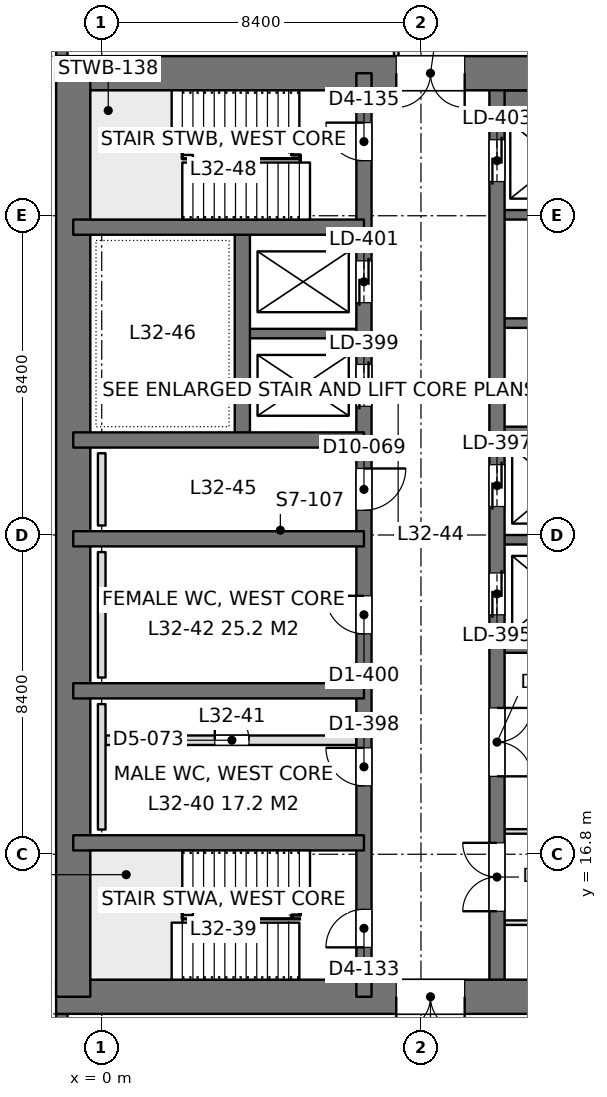
"""IFC4 building model, lengths in metres.
Left out: names, types, materials, properties, quantities, classifications, styles, units other than length and angle.
Written with IfcOpenShell. Run it as: python <this file> out.ifc"""

import sys

from ifc_helpers import new_model, si_unit, direction, frame, frame_2d, origin, place, context, subcontext, project, spatial, rectangle, extrude, element, fill, save


model = new_model("IFC4")
c1 = context("Model", 3, precision=1e-05, world=origin(), true_north=direction((0.0, 1.0)))
c2 = subcontext(c1, "Body", "Model", "MODEL_VIEW")
j1 = project(units=[si_unit("LENGTHUNIT", "METRE"), si_unit("PLANEANGLEUNIT", "RADIAN")], contexts=[c1])
p1 = place(None, origin())
s1 = spatial("IfcSite", under=j1, at=p1, CompositionType="ELEMENT")
p2 = place(p1, origin())
s2 = spatial("IfcBuilding", under=s1, at=p2, CompositionType="ELEMENT")
p3 = place(p2, frame((0.0, 0.0, 142.8)))
s3 = spatial("IfcBuildingStorey", under=s2, at=p3, CompositionType="ELEMENT", Elevation=142.8)
p4 = place(p3, frame((-1.2, 13.05, 0.0), z_axis=(0.0, 0.0, 1.0), x_axis=(1.0, 0.0, 0.0)))
e1 = element("IfcWall", 1, at=p4, inside=s3, PredefinedType="SHEAR", context=c2, shape_type="SweptSolid", body=[
    extrude(rectangle(XDim=18.0, YDim=0.9, at=frame_2d((9.0, 0.0))), origin(), (0.0, 0.0, 1.0), 4.2),
])
p5 = place(p4, frame((8.95, 0.0, 0.0)))
e2 = element("IfcOpeningElement", 2, at=p5, cuts=e1, PredefinedType="OPENING", context=c2, shape_type="SweptSolid", body=[
    extrude(rectangle(XDim=1.8, YDim=2.4, at=frame_2d((0.9, 1.2))), frame((0.0, 0.46, 0.0), z_axis=(0.0, -1.0, 0.0), x_axis=(1.0, 0.0, 0.0)), (0.0, 0.0, 1.0), 0.92),
])
p6 = place(p3, frame((-1.2, 37.35, 0.0), z_axis=(0.0, 0.0, 1.0), x_axis=(1.0, 0.0, 0.0)))
e3 = element("IfcWall", 3, at=p6, inside=s3, PredefinedType="SHEAR", context=c2, shape_type="SweptSolid", body=[
    extrude(rectangle(XDim=18.0, YDim=0.9, at=frame_2d((9.0, 0.0))), origin(), (0.0, 0.0, 1.0), 4.2),
])
p7 = place(p6, frame((8.95, 0.0, 0.0)))
e4 = element("IfcOpeningElement", 4, at=p7, cuts=e3, PredefinedType="OPENING", context=c2, shape_type="SweptSolid", body=[
    extrude(rectangle(XDim=1.8, YDim=2.4, at=frame_2d((0.9, 1.2))), frame((0.0, 0.46, 0.0), z_axis=(0.0, -1.0, 0.0), x_axis=(1.0, 0.0, 0.0)), (0.0, 0.0, 1.0), 0.92),
])
p8 = place(p3, frame((-0.75, 13.05, 0.0), z_axis=(0.0, 0.0, 1.0), x_axis=(0.0, 1.0, 0.0)))
e5 = element("IfcWall", 5, at=p8, inside=s3, PredefinedType="SHEAR", context=c2, shape_type="SweptSolid", body=[
    extrude(rectangle(XDim=24.3, YDim=0.9, at=frame_2d((12.15, 0.0))), origin(), (0.0, 0.0, 1.0), 4.2),
])
p9 = place(p3, frame((6.9, 13.05, 0.0), z_axis=(0.0, 0.0, 1.0), x_axis=(0.0, 1.0, 0.0)))
e6 = element("IfcWall", 6, at=p9, inside=s3, PredefinedType="SHEAR", context=c2, shape_type="SweptSolid", body=[
    extrude(rectangle(XDim=24.3, YDim=0.4, at=frame_2d((12.15, 0.0))), origin(), (0.0, 0.0, 1.0), 4.2),
])
p10 = place(p9, frame((1.3, 0.0, 0.0)))
e7 = element("IfcOpeningElement", 7, at=p10, cuts=e6, PredefinedType="OPENING", context=c2, shape_type="SweptSolid", body=[
    extrude(rectangle(XDim=1.0, YDim=2.2, at=frame_2d((0.5, 1.1))), frame((0.0, 0.21, 0.0), z_axis=(0.0, -1.0, 0.0), x_axis=(1.0, 0.0, 0.0)), (0.0, 0.0, 1.0), 0.42),
])
p11 = place(p9, frame((22.0, 0.0, 0.0)))
e8 = element("IfcOpeningElement", 8, at=p11, cuts=e6, PredefinedType="OPENING", context=c2, shape_type="SweptSolid", body=[
    extrude(rectangle(XDim=1.0, YDim=2.2, at=frame_2d((0.5, 1.1))), frame((0.0, 0.21, 0.0), z_axis=(0.0, -1.0, 0.0), x_axis=(1.0, 0.0, 0.0)), (0.0, 0.0, 1.0), 0.42),
])
p12 = place(p9, frame((5.55, 0.0, 0.0)))
e9 = element("IfcOpeningElement", 9, at=p12, cuts=e6, PredefinedType="OPENING", context=c2, shape_type="SweptSolid", body=[
    extrude(rectangle(XDim=1.0, YDim=2.2, at=frame_2d((0.5, 1.1))), frame((0.0, 0.21, 0.0), z_axis=(0.0, -1.0, 0.0), x_axis=(1.0, 0.0, 0.0)), (0.0, 0.0, 1.0), 0.42),
])
p13 = place(p9, frame((9.55, 0.0, 0.0)))
e10 = element("IfcOpeningElement", 10, at=p13, cuts=e6, PredefinedType="OPENING", context=c2, shape_type="SweptSolid", body=[
    extrude(rectangle(XDim=1.0, YDim=2.2, at=frame_2d((0.5, 1.1))), frame((0.0, 0.21, 0.0), z_axis=(0.0, -1.0, 0.0), x_axis=(1.0, 0.0, 0.0)), (0.0, 0.0, 1.0), 0.42),
])
p14 = place(p9, frame((12.8, 0.0, 0.0)))
e11 = element("IfcOpeningElement", 11, at=p14, cuts=e6, PredefinedType="OPENING", context=c2, shape_type="SweptSolid", body=[
    extrude(rectangle(XDim=1.1, YDim=2.2, at=frame_2d((0.55, 1.1))), frame((0.0, 0.21, 0.0), z_axis=(0.0, -1.0, 0.0), x_axis=(1.0, 0.0, 0.0)), (0.0, 0.0, 1.0), 0.42),
])
p15 = place(p9, frame((15.538, 0.0, 0.0)))
e12 = element("IfcOpeningElement", 12, at=p15, cuts=e6, PredefinedType="OPENING", context=c2, shape_type="SweptSolid", body=[
    extrude(rectangle(XDim=1.1, YDim=2.2, at=frame_2d((0.55, 1.1))), frame((0.0, 0.21, 0.0), z_axis=(0.0, -1.0, 0.0), x_axis=(1.0, 0.0, 0.0)), (0.0, 0.0, 1.0), 0.42),
])
p16 = place(p9, frame((18.262, 0.0, 0.0)))
e13 = element("IfcOpeningElement", 13, at=p16, cuts=e6, PredefinedType="OPENING", context=c2, shape_type="SweptSolid", body=[
    extrude(rectangle(XDim=1.1, YDim=2.2, at=frame_2d((0.55, 1.1))), frame((0.0, 0.21, 0.0), z_axis=(0.0, -1.0, 0.0), x_axis=(1.0, 0.0, 0.0)), (0.0, 0.0, 1.0), 0.42),
])
p17 = place(p3, frame((10.4, 13.05, 0.0), z_axis=(0.0, 0.0, 1.0), x_axis=(0.0, 1.0, 0.0)))
e14 = element("IfcWall", 14, at=p17, inside=s3, PredefinedType="SHEAR", context=c2, shape_type="SweptSolid", body=[
    extrude(rectangle(XDim=24.3, YDim=0.4, at=frame_2d((12.15, 0.0))), origin(), (0.0, 0.0, 1.0), 4.2),
])
p18 = place(p17, frame((10.05, 0.0, 0.0)))
e15 = element("IfcOpeningElement", 15, at=p18, cuts=e14, PredefinedType="OPENING", context=c2, shape_type="SweptSolid", body=[
    extrude(rectangle(XDim=1.1, YDim=2.2, at=frame_2d((0.55, 1.1))), frame((0.0, 0.21, 0.0), z_axis=(0.0, -1.0, 0.0), x_axis=(1.0, 0.0, 0.0)), (0.0, 0.0, 1.0), 0.42),
])
p19 = place(p17, frame((12.9, 0.0, 0.0)))
e16 = element("IfcOpeningElement", 16, at=p19, cuts=e14, PredefinedType="OPENING", context=c2, shape_type="SweptSolid", body=[
    extrude(rectangle(XDim=1.1, YDim=2.2, at=frame_2d((0.55, 1.1))), frame((0.0, 0.21, 0.0), z_axis=(0.0, -1.0, 0.0), x_axis=(1.0, 0.0, 0.0)), (0.0, 0.0, 1.0), 0.42),
])
p20 = place(p17, frame((21.45, 0.0, 0.0)))
e17 = element("IfcOpeningElement", 17, at=p20, cuts=e14, PredefinedType="OPENING", context=c2, shape_type="SweptSolid", body=[
    extrude(rectangle(XDim=1.1, YDim=2.2, at=frame_2d((0.55, 1.1))), frame((0.0, 0.21, 0.0), z_axis=(0.0, -1.0, 0.0), x_axis=(1.0, 0.0, 0.0)), (0.0, 0.0, 1.0), 0.42),
])
p21 = place(p17, frame((2.25, 0.0, 0.0)))
e18 = element("IfcOpeningElement", 18, at=p21, cuts=e14, PredefinedType="OPENING", context=c2, shape_type="SweptSolid", body=[
    extrude(rectangle(XDim=1.8, YDim=2.4, at=frame_2d((0.9, 1.2))), frame((0.0, 0.21, 0.0), z_axis=(0.0, -1.0, 0.0), x_axis=(1.0, 0.0, 0.0)), (0.0, 0.0, 1.0), 0.42),
])
p22 = place(p17, frame((5.8, 0.0, 0.0)))
e19 = element("IfcOpeningElement", 19, at=p22, cuts=e14, PredefinedType="OPENING", context=c2, shape_type="SweptSolid", body=[
    extrude(rectangle(XDim=1.8, YDim=2.4, at=frame_2d((0.9, 1.2))), frame((0.0, 0.21, 0.0), z_axis=(0.0, -1.0, 0.0), x_axis=(1.0, 0.0, 0.0)), (0.0, 0.0, 1.0), 0.42),
])
for number, where, z_axis, x_axis in (
    (20, (-0.75, 17.1, 0.0), (0.0, 0.0, 1.0), (1.0, 0.0, 0.0)),
    (21, (-0.75, 21.1, 0.0), (0.0, 0.0, 1.0), (1.0, 0.0, 0.0)),
    (22, (-0.75, 25.1, 0.0), (0.0, 0.0, 1.0), (1.0, 0.0, 0.0)),
    (23, (-0.75, 27.7, 0.0), (0.0, 0.0, 1.0), (1.0, 0.0, 0.0)),
    (24, (-0.75, 33.3, 0.0), (0.0, 0.0, 1.0), (1.0, 0.0, 0.0)),
):
    element("IfcWall", number, at=place(p3, frame(where, z_axis=z_axis, x_axis=x_axis)), inside=s3, PredefinedType="SHEAR", context=c2, shape_type="SweptSolid", body=[
        extrude(rectangle(XDim=7.65, YDim=0.4, at=frame_2d((3.825, 0.0))), origin(), (0.0, 0.0, 1.0), 4.2),
    ])
p23 = place(p3, frame((3.7, 27.7, 0.0), z_axis=(0.0, 0.0, 1.0), x_axis=(0.0, 1.0, 0.0)))
e25 = element("IfcWall", 25, at=p23, inside=s3, PredefinedType="SHEAR", context=c2, shape_type="SweptSolid", body=[
    extrude(rectangle(XDim=5.6, YDim=0.4, at=frame_2d((2.8, 0.0))), origin(), (0.0, 0.0, 1.0), 4.2),
])
p24 = place(p3, frame((3.7, 30.5, 0.0), z_axis=(0.0, 0.0, 1.0), x_axis=(1.0, 0.0, 0.0)))
e26 = element("IfcWall", 26, at=p24, inside=s3, PredefinedType="SHEAR", context=c2, shape_type="SweptSolid", body=[
    extrude(rectangle(XDim=3.2, YDim=0.25, at=frame_2d((1.6, 0.0))), origin(), (0.0, 0.0, 1.0), 4.2),
])
p25 = place(p3, frame((10.4, 22.225, 0.0), z_axis=(0.0, 0.0, 1.0), x_axis=(1.0, 0.0, 0.0)))
e27 = element("IfcWall", 27, at=p25, inside=s3, PredefinedType="SHEAR", context=c2, shape_type="SweptSolid", body=[
    extrude(rectangle(XDim=5.95, YDim=0.25, at=frame_2d((2.975, 0.0))), origin(), (0.0, 0.0, 1.0), 4.2),
])
for number, where, z_axis, x_axis in (
    (28, (10.4, 25.075, 0.0), (0.0, 0.0, 1.0), (1.0, 0.0, 0.0)),
    (29, (10.4, 27.925, 0.0), (0.0, 0.0, 1.0), (1.0, 0.0, 0.0)),
    (30, (10.4, 30.775, 0.0), (0.0, 0.0, 1.0), (1.0, 0.0, 0.0)),
    (31, (10.4, 33.625, 0.0), (0.0, 0.0, 1.0), (1.0, 0.0, 0.0)),
):
    element("IfcWall", number, at=place(p3, frame(where, z_axis=z_axis, x_axis=x_axis)), inside=s3, PredefinedType="SHEAR", context=c2, shape_type="SweptSolid", body=[
        extrude(rectangle(XDim=3.2, YDim=0.25, at=frame_2d((1.6, 0.0))), origin(), (0.0, 0.0, 1.0), 4.2),
    ])
p26 = place(p3, frame((10.4, 36.625, 0.0), z_axis=(0.0, 0.0, 1.0), x_axis=(1.0, 0.0, 0.0)))
e32 = element("IfcWall", 32, at=p26, inside=s3, PredefinedType="SHEAR", context=c2, shape_type="SweptSolid", body=[
    extrude(rectangle(XDim=3.2, YDim=0.55, at=frame_2d((1.6, 0.0))), origin(), (0.0, 0.0, 1.0), 4.2),
])
p27 = place(p3, frame((-1.05, 8.4, 0.0), z_axis=(0.0, 0.0, 1.0), x_axis=(0.0, 1.0, 0.0)))
e33 = element("IfcWall", 33, at=p27, inside=s3, PredefinedType="SOLIDWALL", context=c2, shape_type="SweptSolid", body=[
    extrude(rectangle(XDim=4.2, YDim=0.3, at=frame_2d((2.1, 0.0))), origin(), (0.0, 0.0, 1.0), 4.05),
])
p28 = place(p27, frame((0.9, 0.0, 0.9)))
e34 = element("IfcOpeningElement", 34, at=p28, cuts=e33, PredefinedType="OPENING", context=c2, shape_type="SweptSolid", body=[
    extrude(rectangle(XDim=2.4, YDim=1.9, at=frame_2d((1.2, 0.95))), frame((0.0, 0.16, 0.0), z_axis=(0.0, -1.0, 0.0), x_axis=(1.0, 0.0, 0.0)), (0.0, 0.0, 1.0), 0.32),
])
p29 = place(p3, frame((-1.05, 37.8, 0.0), z_axis=(0.0, 0.0, 1.0), x_axis=(0.0, 1.0, 0.0)))
e35 = element("IfcWall", 35, at=p29, inside=s3, PredefinedType="SOLIDWALL", context=c2, shape_type="SweptSolid", body=[
    extrude(rectangle(XDim=4.2, YDim=0.3, at=frame_2d((2.1, 0.0))), origin(), (0.0, 0.0, 1.0), 4.05),
])
p30 = place(p29, frame((0.9, 0.0, 0.9)))
e36 = element("IfcOpeningElement", 36, at=p30, cuts=e35, PredefinedType="OPENING", context=c2, shape_type="SweptSolid", body=[
    extrude(rectangle(XDim=2.4, YDim=1.9, at=frame_2d((1.2, 0.95))), frame((0.0, 0.16, 0.0), z_axis=(0.0, -1.0, 0.0), x_axis=(1.0, 0.0, 0.0)), (0.0, 0.0, 1.0), 0.32),
])
p31 = place(p3, frame((10.598, 17.4, 0.0), z_axis=(0.0, 0.0, 1.0), x_axis=(1.0, 0.0, 0.0)))
e37 = element("IfcWall", 37, at=p31, inside=s3, PredefinedType="PARTITIONING", context=c2, shape_type="SweptSolid", body=[
    extrude(rectangle(XDim=5.904, YDim=0.12, at=frame_2d((2.952, 0.0))), origin(), (0.0, 0.0, 1.0), 3.55),
])
p32 = place(p31, frame((4.152, 0.0, 0.0)))
e38 = element("IfcOpeningElement", 38, at=p32, cuts=e37, PredefinedType="OPENING", context=c2, shape_type="SweptSolid", body=[
    extrude(rectangle(XDim=1.0, YDim=2.4, at=frame_2d((0.5, 1.2))), frame((0.0, 0.07, 0.0), z_axis=(0.0, -1.0, 0.0), x_axis=(1.0, 0.0, 0.0)), (0.0, 0.0, 1.0), 0.14),
])
p33 = place(p3, frame((10.598, 15.0, 0.0), z_axis=(0.0, 0.0, 1.0), x_axis=(1.0, 0.0, 0.0)))
e39 = element("IfcWall", 39, at=p33, inside=s3, PredefinedType="PARTITIONING", context=c2, shape_type="SweptSolid", body=[
    extrude(rectangle(XDim=6.204, YDim=0.12, at=frame_2d((3.102, 0.0))), origin(), (0.0, 0.0, 1.0), 3.55),
])
p34 = place(p3, frame((7.75, 37.8, 0.0), z_axis=(0.0, 0.0, 1.0), x_axis=(0.0, 1.0, 0.0)))
e40 = element("IfcWall", 40, at=p34, inside=s3, PredefinedType="PARTITIONING", context=c2, shape_type="SweptSolid", body=[
    extrude(rectangle(XDim=2.0, YDim=0.12, at=frame_2d((1.0, 0.0))), origin(), (0.0, 0.0, 1.0), 4.05),
])
p35 = place(p3, frame((0.1, 19.8, 0.0), z_axis=(0.0, 0.0, 1.0), x_axis=(1.0, 0.0, 0.0)))
e41 = element("IfcWall", 41, at=p35, inside=s3, PredefinedType="PARTITIONING", context=c2, shape_type="SweptSolid", body=[
    extrude(rectangle(XDim=6.6, YDim=0.25, at=frame_2d((3.3, 0.0))), origin(), (0.0, 0.0, 1.0), 4.0),
])
p36 = place(p35, frame((2.875, 0.0, 0.0)))
e42 = element("IfcOpeningElement", 42, at=p36, cuts=e41, PredefinedType="OPENING", context=c2, shape_type="SweptSolid", body=[
    extrude(rectangle(XDim=0.9, YDim=2.2, at=frame_2d((0.45, 1.1))), frame((0.0, 0.135, 0.0), z_axis=(0.0, -1.0, 0.0), x_axis=(1.0, 0.0, 0.0)), (0.0, 0.0, 1.0), 0.27),
])
for number, where, z_axis, x_axis in (
    (43, (0.0, 17.45, 0.0), (0.0, 0.0, 1.0), (0.0, 1.0, 0.0)),
    (44, (0.0, 21.45, 0.0), (0.0, 0.0, 1.0), (0.0, 1.0, 0.0)),
):
    element("IfcWall", number, at=place(p3, frame(where, z_axis=z_axis, x_axis=x_axis)), inside=s3, PredefinedType="PLUMBINGWALL", context=c2, shape_type="SweptSolid", body=[
        extrude(rectangle(XDim=3.3, YDim=0.2, at=frame_2d((1.65, 0.0))), origin(), (0.0, 0.0, 1.0), 1.2),
    ])
p37 = place(p3, frame((0.0, 25.45, 0.0), z_axis=(0.0, 0.0, 1.0), x_axis=(0.0, 1.0, 0.0)))
e45 = element("IfcWall", 45, at=p37, inside=s3, PredefinedType="PLUMBINGWALL", context=c2, shape_type="SweptSolid", body=[
    extrude(rectangle(XDim=1.9, YDim=0.2, at=frame_2d((0.95, 0.0))), origin(), (0.0, 0.0, 1.0), 1.2),
])
p38 = place(p5, frame((1.8, 0.0, 0.0), z_axis=(0.0, 0.0, 1.0), x_axis=(-1.0, 0.0, 0.0)))
e46 = element("IfcDoor", 46, at=p38, inside=s3, OperationType="DOUBLE_DOOR_SINGLE_SWING", PredefinedType="DOOR", context=c2, shape_type="SweptSolid", body=[
    extrude(rectangle(XDim=1.8, YDim=2.4, at=frame_2d((0.9, 1.2))), frame((0.0, 0.025, 0.0), z_axis=(0.0, -1.0, 0.0), x_axis=(1.0, 0.0, 0.0)), (0.0, 0.0, 1.0), 0.05),
])
fill(e2, e46)
p39 = place(p7, frame((1.8, 0.0, 0.0), z_axis=(0.0, 0.0, 1.0), x_axis=(-1.0, 0.0, 0.0)))
e47 = element("IfcDoor", 47, at=p39, inside=s3, OperationType="DOUBLE_DOOR_SINGLE_SWING", PredefinedType="DOOR", context=c2, shape_type="SweptSolid", body=[
    extrude(rectangle(XDim=1.8, YDim=2.4, at=frame_2d((0.9, 1.2))), frame((0.0, 0.025, 0.0), z_axis=(0.0, -1.0, 0.0), x_axis=(1.0, 0.0, 0.0)), (0.0, 0.0, 1.0), 0.05),
])
fill(e4, e47)
p40 = place(p10, origin())
e48 = element("IfcDoor", 48, at=p40, inside=s3, OperationType="SINGLE_SWING_LEFT", PredefinedType="DOOR", context=c2, shape_type="SweptSolid", body=[
    extrude(rectangle(XDim=1.0, YDim=2.2, at=frame_2d((0.5, 1.1))), frame((0.0, 0.025, 0.0), z_axis=(0.0, -1.0, 0.0), x_axis=(1.0, 0.0, 0.0)), (0.0, 0.0, 1.0), 0.05),
])
fill(e7, e48)
p41 = place(p11, origin())
e49 = element("IfcDoor", 49, at=p41, inside=s3, OperationType="SINGLE_SWING_RIGHT", PredefinedType="DOOR", context=c2, shape_type="SweptSolid", body=[
    extrude(rectangle(XDim=1.0, YDim=2.2, at=frame_2d((0.5, 1.1))), frame((0.0, 0.025, 0.0), z_axis=(0.0, -1.0, 0.0), x_axis=(1.0, 0.0, 0.0)), (0.0, 0.0, 1.0), 0.05),
])
fill(e8, e49)
p42 = place(p12, origin())
e50 = element("IfcDoor", 50, at=p42, inside=s3, OperationType="SINGLE_SWING_RIGHT", PredefinedType="DOOR", context=c2, shape_type="SweptSolid", body=[
    extrude(rectangle(XDim=1.0, YDim=2.2, at=frame_2d((0.5, 1.1))), frame((0.0, 0.025, 0.0), z_axis=(0.0, -1.0, 0.0), x_axis=(1.0, 0.0, 0.0)), (0.0, 0.0, 1.0), 0.05),
])
fill(e9, e50)
p43 = place(p13, origin())
e51 = element("IfcDoor", 51, at=p43, inside=s3, OperationType="SINGLE_SWING_RIGHT", PredefinedType="DOOR", context=c2, shape_type="SweptSolid", body=[
    extrude(rectangle(XDim=1.0, YDim=2.2, at=frame_2d((0.5, 1.1))), frame((0.0, 0.025, 0.0), z_axis=(0.0, -1.0, 0.0), x_axis=(1.0, 0.0, 0.0)), (0.0, 0.0, 1.0), 0.05),
])
fill(e10, e51)
p44 = place(p14, frame((1.1, 0.0, 0.0), z_axis=(0.0, 0.0, 1.0), x_axis=(-1.0, 0.0, 0.0)))
e52 = element("IfcDoor", 52, at=p44, inside=s3, OperationType="SINGLE_SWING_LEFT", PredefinedType="DOOR", context=c2, shape_type="SweptSolid", body=[
    extrude(rectangle(XDim=1.1, YDim=2.2, at=frame_2d((0.55, 1.1))), frame((0.0, 0.025, 0.0), z_axis=(0.0, -1.0, 0.0), x_axis=(1.0, 0.0, 0.0)), (0.0, 0.0, 1.0), 0.05),
])
fill(e11, e52)
p45 = place(p18, origin())
e53 = element("IfcDoor", 53, at=p45, inside=s3, OperationType="DOUBLE_DOOR_SLIDING", PredefinedType="DOOR", context=c2, shape_type="SweptSolid", body=[
    extrude(rectangle(XDim=1.1, YDim=2.2, at=frame_2d((0.55, 1.1))), frame((0.0, 0.025, 0.0), z_axis=(0.0, -1.0, 0.0), x_axis=(1.0, 0.0, 0.0)), (0.0, 0.0, 1.0), 0.05),
])
fill(e15, e53)
p46 = place(p19, origin())
e54 = element("IfcDoor", 54, at=p46, inside=s3, OperationType="DOUBLE_DOOR_SLIDING", PredefinedType="DOOR", context=c2, shape_type="SweptSolid", body=[
    extrude(rectangle(XDim=1.1, YDim=2.2, at=frame_2d((0.55, 1.1))), frame((0.0, 0.025, 0.0), z_axis=(0.0, -1.0, 0.0), x_axis=(1.0, 0.0, 0.0)), (0.0, 0.0, 1.0), 0.05),
])
fill(e16, e54)
p47 = place(p20, origin())
e55 = element("IfcDoor", 55, at=p47, inside=s3, OperationType="DOUBLE_DOOR_SLIDING", PredefinedType="DOOR", context=c2, shape_type="SweptSolid", body=[
    extrude(rectangle(XDim=1.1, YDim=2.2, at=frame_2d((0.55, 1.1))), frame((0.0, 0.025, 0.0), z_axis=(0.0, -1.0, 0.0), x_axis=(1.0, 0.0, 0.0)), (0.0, 0.0, 1.0), 0.05),
])
fill(e17, e55)
p48 = place(p15, origin())
e56 = element("IfcDoor", 56, at=p48, inside=s3, OperationType="DOUBLE_DOOR_SLIDING", PredefinedType="DOOR", context=c2, shape_type="SweptSolid", body=[
    extrude(rectangle(XDim=1.1, YDim=2.2, at=frame_2d((0.55, 1.1))), frame((0.0, 0.025, 0.0), z_axis=(0.0, -1.0, 0.0), x_axis=(1.0, 0.0, 0.0)), (0.0, 0.0, 1.0), 0.05),
])
fill(e12, e56)
p49 = place(p16, origin())
e57 = element("IfcDoor", 57, at=p49, inside=s3, OperationType="DOUBLE_DOOR_SLIDING", PredefinedType="DOOR", context=c2, shape_type="SweptSolid", body=[
    extrude(rectangle(XDim=1.1, YDim=2.2, at=frame_2d((0.55, 1.1))), frame((0.0, 0.025, 0.0), z_axis=(0.0, -1.0, 0.0), x_axis=(1.0, 0.0, 0.0)), (0.0, 0.0, 1.0), 0.05),
])
fill(e13, e57)
p50 = place(p21, origin())
e58 = element("IfcDoor", 58, at=p50, inside=s3, OperationType="DOUBLE_DOOR_SINGLE_SWING", PredefinedType="DOOR", context=c2, shape_type="SweptSolid", body=[
    extrude(rectangle(XDim=1.8, YDim=2.4, at=frame_2d((0.9, 1.2))), frame((0.0, 0.025, 0.0), z_axis=(0.0, -1.0, 0.0), x_axis=(1.0, 0.0, 0.0)), (0.0, 0.0, 1.0), 0.05),
])
fill(e18, e58)
p51 = place(p22, frame((1.8, 0.0, 0.0), z_axis=(0.0, 0.0, 1.0), x_axis=(-1.0, 0.0, 0.0)))
e59 = element("IfcDoor", 59, at=p51, inside=s3, OperationType="DOUBLE_DOOR_SINGLE_SWING", PredefinedType="DOOR", context=c2, shape_type="SweptSolid", body=[
    extrude(rectangle(XDim=1.8, YDim=2.4, at=frame_2d((0.9, 1.2))), frame((0.0, 0.025, 0.0), z_axis=(0.0, -1.0, 0.0), x_axis=(1.0, 0.0, 0.0)), (0.0, 0.0, 1.0), 0.05),
])
fill(e19, e59)
p52 = place(p36, origin())
e60 = element("IfcDoor", 60, at=p52, inside=s3, OperationType="SINGLE_SWING_LEFT", PredefinedType="DOOR", context=c2, shape_type="SweptSolid", body=[
    extrude(rectangle(XDim=0.9, YDim=2.2, at=frame_2d((0.45, 1.1))), frame((0.0, 0.025, 0.0), z_axis=(0.0, -1.0, 0.0), x_axis=(1.0, 0.0, 0.0)), (0.0, 0.0, 1.0), 0.05),
])
fill(e42, e60)
save(model, sys.argv[1])
